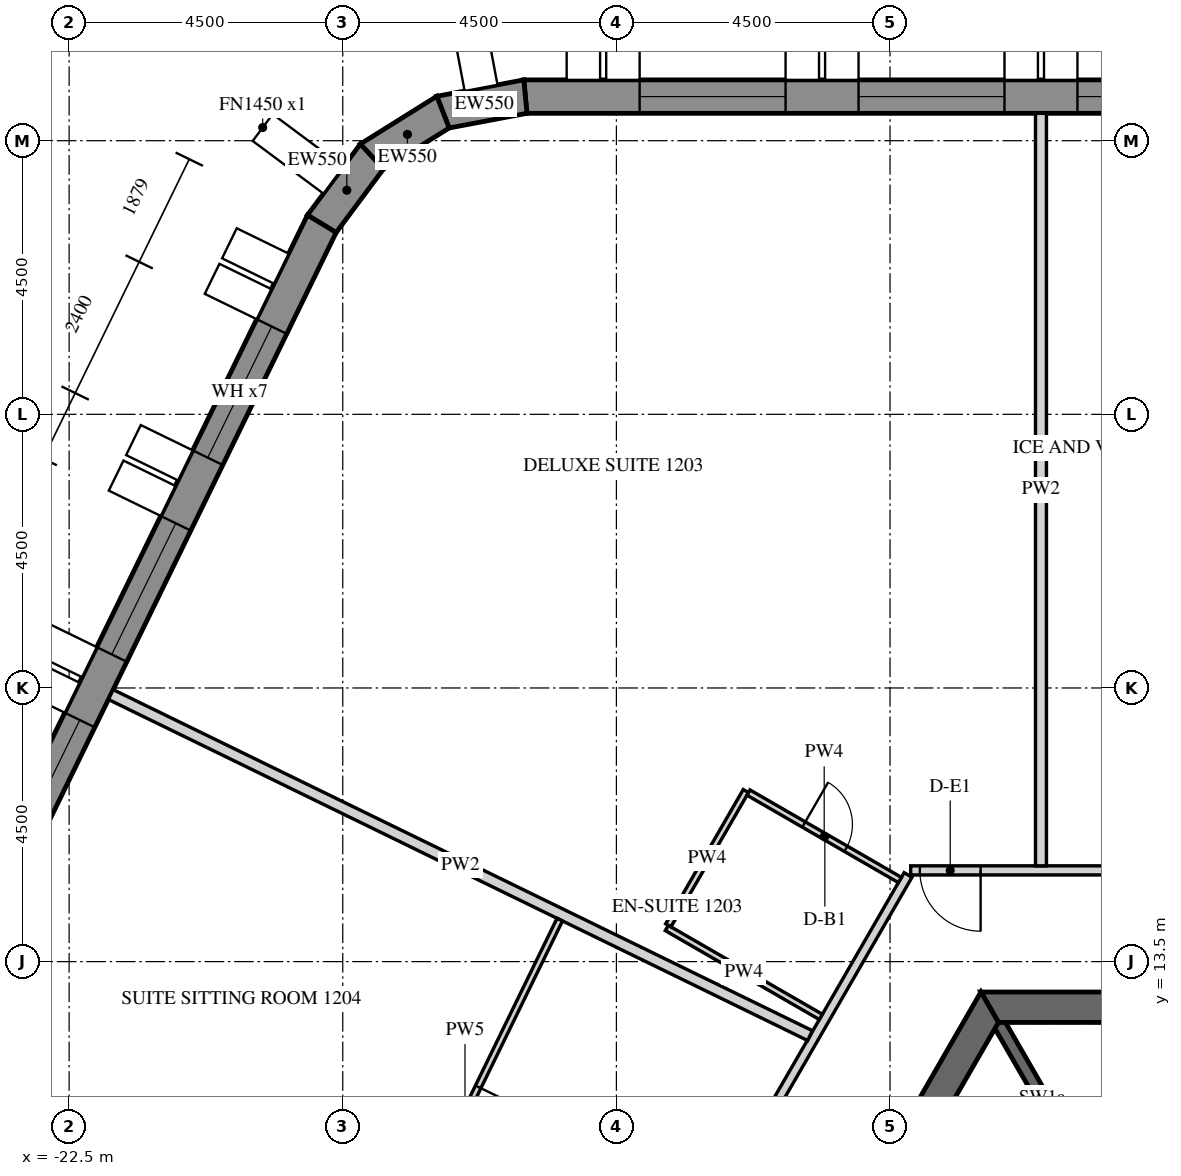
"""IFC4 building model, lengths in metres.
Left out: names, types, materials, properties, quantities, classifications, styles, units other than length and angle.
Written with IfcOpenShell. Run it as: python <this file> out.ifc"""

import sys

from ifc_helpers import new_model, si_unit, direction, frame, frame_2d, origin, place, context, subcontext, project, spatial, polyline, rectangle, outline, extrude, element, fill, save


model = new_model("IFC4")
c1 = context("Model", 3, precision=1e-05, world=origin(), true_north=direction((0.0, 1.0)))
c2 = subcontext(c1, "Body", "Model", "MODEL_VIEW")
j1 = project(units=[si_unit("LENGTHUNIT", "METRE"), si_unit("PLANEANGLEUNIT", "RADIAN")], contexts=[c1])
p1 = place(None, origin())
s1 = spatial("IfcSite", under=j1, at=p1, CompositionType="ELEMENT")
p2 = place(p1, origin())
s2 = spatial("IfcBuilding", under=s1, at=p2, CompositionType="ELEMENT")
p3 = place(p2, frame((0.0, 0.0, 164.4)))
s3 = spatial("IfcBuildingStorey", under=s2, at=p3, CompositionType="ELEMENT", Elevation=164.4)
p4 = place(p3, frame((12.761, 27.725, -0.15), z_axis=(0.0, 0.0, 1.0), x_axis=(-1.0, 0.0, 0.0)))
e1 = element("IfcWall", 1, at=p4, inside=s3, PredefinedType="SOLIDWALL", context=c2, shape_type="SweptSolid", body=[
    extrude(outline(polyline([(-0.022, -0.275), (27.783, -0.275), (27.732, 0.275), (0.022, 0.275), (-0.022, -0.275)])), origin(), (0.0, 0.0, 1.0), 3.9),
])
p5 = place(p4, frame((1.879, 0.0, 1.05)))
e2 = element("IfcOpeningElement", 2, at=p5, cuts=e1, PredefinedType="OPENING", context=c2, shape_type="SweptSolid", body=[
    extrude(rectangle(XDim=2.4, YDim=2.4, at=frame_2d((1.2, 1.2))), frame((0.0, 0.285, 0.0), z_axis=(0.0, -1.0, 0.0), x_axis=(1.0, 0.0, 0.0)), (0.0, 0.0, 1.0), 0.57),
])
p6 = place(p4, frame((5.479, 0.0, 1.05)))
e3 = element("IfcOpeningElement", 3, at=p6, cuts=e1, PredefinedType="OPENING", context=c2, shape_type="SweptSolid", body=[
    extrude(rectangle(XDim=2.4, YDim=2.4, at=frame_2d((1.2, 1.2))), frame((0.0, 0.285, 0.0), z_axis=(0.0, -1.0, 0.0), x_axis=(1.0, 0.0, 0.0)), (0.0, 0.0, 1.0), 0.57),
])
p7 = place(p4, frame((9.079, 0.0, 1.05)))
e4 = element("IfcOpeningElement", 4, at=p7, cuts=e1, PredefinedType="OPENING", context=c2, shape_type="SweptSolid", body=[
    extrude(rectangle(XDim=2.4, YDim=2.4, at=frame_2d((1.2, 1.2))), frame((0.0, 0.285, 0.0), z_axis=(0.0, -1.0, 0.0), x_axis=(1.0, 0.0, 0.0)), (0.0, 0.0, 1.0), 0.57),
])
p8 = place(p4, frame((12.679, 0.0, 1.05)))
e5 = element("IfcOpeningElement", 5, at=p8, cuts=e1, PredefinedType="OPENING", context=c2, shape_type="SweptSolid", body=[
    extrude(rectangle(XDim=2.4, YDim=2.4, at=frame_2d((1.2, 1.2))), frame((0.0, 0.285, 0.0), z_axis=(0.0, -1.0, 0.0), x_axis=(1.0, 0.0, 0.0)), (0.0, 0.0, 1.0), 0.57),
])
p9 = place(p4, frame((16.279, 0.0, 1.05)))
e6 = element("IfcOpeningElement", 6, at=p9, cuts=e1, PredefinedType="OPENING", context=c2, shape_type="SweptSolid", body=[
    extrude(rectangle(XDim=2.4, YDim=2.4, at=frame_2d((1.2, 1.2))), frame((0.0, 0.285, 0.0), z_axis=(0.0, -1.0, 0.0), x_axis=(1.0, 0.0, 0.0)), (0.0, 0.0, 1.0), 0.57),
])
p10 = place(p4, frame((19.879, 0.0, 1.05)))
e7 = element("IfcOpeningElement", 7, at=p10, cuts=e1, PredefinedType="OPENING", context=c2, shape_type="SweptSolid", body=[
    extrude(rectangle(XDim=2.4, YDim=2.4, at=frame_2d((1.2, 1.2))), frame((0.0, 0.285, 0.0), z_axis=(0.0, -1.0, 0.0), x_axis=(1.0, 0.0, 0.0)), (0.0, 0.0, 1.0), 0.57),
])
p11 = place(p4, frame((23.479, 0.0, 1.05)))
e8 = element("IfcOpeningElement", 8, at=p11, cuts=e1, PredefinedType="OPENING", context=c2, shape_type="SweptSolid", body=[
    extrude(rectangle(XDim=2.4, YDim=2.4, at=frame_2d((1.2, 1.2))), frame((0.0, 0.285, 0.0), z_axis=(0.0, -1.0, 0.0), x_axis=(1.0, 0.0, 0.0)), (0.0, 0.0, 1.0), 0.57),
])
p12 = place(p3, frame((-14.997, 27.725, -0.15), z_axis=(0.0, 0.0, 1.0), x_axis=(-0.982705443133, -0.185175624845, 0.0)))
e9 = element("IfcWall", 9, at=p12, inside=s3, PredefinedType="SOLIDWALL", context=c2, shape_type="SweptSolid", body=[
    extrude(outline(polyline([(-0.026, -0.275), (1.431, -0.275), (1.327, 0.275), (0.026, 0.275), (-0.026, -0.275)])), origin(), (0.0, 0.0, 1.0), 3.9),
])
p13 = place(p3, frame((-16.352, 27.47, -0.15), z_axis=(0.0, 0.0, 1.0), x_axis=(-0.848057977594, -0.5299034503, 0.0)))
e10 = element("IfcWall", 10, at=p13, inside=s3, PredefinedType="SOLIDWALL", context=c2, shape_type="SweptSolid", body=[
    extrude(outline(polyline([(-0.052, -0.275), (1.431, -0.275), (1.327, 0.275), (0.052, 0.275), (-0.052, -0.275)])), origin(), (0.0, 0.0, 1.0), 3.9),
])
p14 = place(p3, frame((-17.521, 26.739, -0.15), z_axis=(0.0, 0.0, 1.0), x_axis=(-0.597135295884, -0.802140535324, 0.0)))
e11 = element("IfcWall", 11, at=p14, inside=s3, PredefinedType="SOLIDWALL", context=c2, shape_type="SweptSolid", body=[
    extrude(outline(polyline([(-0.052, -0.275), (1.405, -0.275), (1.354, 0.275), (0.052, 0.275), (-0.052, -0.275)])), origin(), (0.0, 0.0, 1.0), 3.9),
])
p15 = place(p3, frame((-18.345, 25.633, -0.15), z_axis=(0.0, 0.0, 1.0), x_axis=(-0.43837181828, -0.898793718791, 0.0)))
e12 = element("IfcWall", 12, at=p15, inside=s3, PredefinedType="SOLIDWALL", context=c2, shape_type="SweptSolid", body=[
    extrude(outline(polyline([(-0.026, -0.275), (27.78, -0.275), (27.735, 0.275), (0.026, 0.275), (-0.026, -0.275)])), origin(), (0.0, 0.0, 1.0), 3.9),
])
p16 = place(p15, frame((1.879, 0.0, 1.05)))
e13 = element("IfcOpeningElement", 13, at=p16, cuts=e12, PredefinedType="OPENING", context=c2, shape_type="SweptSolid", body=[
    extrude(rectangle(XDim=2.4, YDim=2.4, at=frame_2d((1.2, 1.2))), frame((0.0, 0.285, 0.0), z_axis=(0.0, -1.0, 0.0), x_axis=(1.0, 0.0, 0.0)), (0.0, 0.0, 1.0), 0.57),
])
p17 = place(p15, frame((5.479, 0.0, 1.05)))
e14 = element("IfcOpeningElement", 14, at=p17, cuts=e12, PredefinedType="OPENING", context=c2, shape_type="SweptSolid", body=[
    extrude(rectangle(XDim=2.4, YDim=2.4, at=frame_2d((1.2, 1.2))), frame((0.0, 0.285, 0.0), z_axis=(0.0, -1.0, 0.0), x_axis=(1.0, 0.0, 0.0)), (0.0, 0.0, 1.0), 0.57),
])
p18 = place(p15, frame((9.079, 0.0, 1.05)))
e15 = element("IfcOpeningElement", 15, at=p18, cuts=e12, PredefinedType="OPENING", context=c2, shape_type="SweptSolid", body=[
    extrude(rectangle(XDim=2.4, YDim=2.4, at=frame_2d((1.2, 1.2))), frame((0.0, 0.285, 0.0), z_axis=(0.0, -1.0, 0.0), x_axis=(1.0, 0.0, 0.0)), (0.0, 0.0, 1.0), 0.57),
])
p19 = place(p15, frame((12.679, 0.0, 1.05)))
e16 = element("IfcOpeningElement", 16, at=p19, cuts=e12, PredefinedType="OPENING", context=c2, shape_type="SweptSolid", body=[
    extrude(rectangle(XDim=2.4, YDim=2.4, at=frame_2d((1.2, 1.2))), frame((0.0, 0.285, 0.0), z_axis=(0.0, -1.0, 0.0), x_axis=(1.0, 0.0, 0.0)), (0.0, 0.0, 1.0), 0.57),
])
p20 = place(p15, frame((16.279, 0.0, 1.05)))
e17 = element("IfcOpeningElement", 17, at=p20, cuts=e12, PredefinedType="OPENING", context=c2, shape_type="SweptSolid", body=[
    extrude(rectangle(XDim=2.4, YDim=2.4, at=frame_2d((1.2, 1.2))), frame((0.0, 0.285, 0.0), z_axis=(0.0, -1.0, 0.0), x_axis=(1.0, 0.0, 0.0)), (0.0, 0.0, 1.0), 0.57),
])
p21 = place(p15, frame((19.879, 0.0, 1.05)))
e18 = element("IfcOpeningElement", 18, at=p21, cuts=e12, PredefinedType="OPENING", context=c2, shape_type="SweptSolid", body=[
    extrude(rectangle(XDim=2.4, YDim=2.4, at=frame_2d((1.2, 1.2))), frame((0.0, 0.285, 0.0), z_axis=(0.0, -1.0, 0.0), x_axis=(1.0, 0.0, 0.0)), (0.0, 0.0, 1.0), 0.57),
])
p22 = place(p15, frame((23.479, 0.0, 1.05)))
e19 = element("IfcOpeningElement", 19, at=p22, cuts=e12, PredefinedType="OPENING", context=c2, shape_type="SweptSolid", body=[
    extrude(rectangle(XDim=2.4, YDim=2.4, at=frame_2d((1.2, 1.2))), frame((0.0, 0.285, 0.0), z_axis=(0.0, -1.0, 0.0), x_axis=(1.0, 0.0, 0.0)), (0.0, 0.0, 1.0), 0.57),
])
p23 = place(p3, frame((-7.361, 12.75, -0.15), z_axis=(0.0, 0.0, 1.0), x_axis=(-0.50000571537, -0.866022103989, 0.0)))
e20 = element("IfcWall", 20, at=p23, inside=s3, PredefinedType="SHEAR", context=c2, shape_type="SweptSolid", body=[
    extrude(outline(polyline([(-0.144, -0.25), (14.867, -0.25), (14.578, 0.25), (0.144, 0.25), (-0.144, -0.25)])), origin(), (0.0, 0.0, 1.0), 3.9),
])
p24 = place(p23, frame((6.49, 0.0, 0.15)))
e21 = element("IfcOpeningElement", 21, at=p24, cuts=e20, PredefinedType="OPENING", context=c2, shape_type="SweptSolid", body=[
    extrude(rectangle(XDim=1.8, YDim=2.4, at=frame_2d((0.9, 1.2))), frame((0.0, 0.26, 0.0), z_axis=(0.0, -1.0, 0.0), x_axis=(1.0, 0.0, 0.0)), (0.0, 0.0, 1.0), 0.52),
])
p25 = place(p3, frame((7.361, 12.75, -0.15), z_axis=(0.0, 0.0, 1.0), x_axis=(-1.0, 0.0, 0.0)))
e22 = element("IfcWall", 22, at=p25, inside=s3, PredefinedType="SHEAR", context=c2, shape_type="SweptSolid", body=[
    extrude(outline(polyline([(-0.144, -0.25), (14.866, -0.25), (14.578, 0.25), (0.144, 0.25), (-0.144, -0.25)])), origin(), (0.0, 0.0, 1.0), 3.9),
])
p26 = place(p25, frame((6.761, 0.0, 0.15)))
e23 = element("IfcOpeningElement", 23, at=p26, cuts=e22, PredefinedType="OPENING", context=c2, shape_type="SweptSolid", body=[
    extrude(rectangle(XDim=1.2, YDim=2.4, at=frame_2d((0.6, 1.2))), frame((0.0, 0.26, 0.0), z_axis=(0.0, -1.0, 0.0), x_axis=(1.0, 0.0, 0.0)), (0.0, 0.0, 1.0), 0.52),
])
p27 = place(p3, frame((-5.773, 10.0, -0.15), z_axis=(0.0, 0.0, 1.0), x_axis=(-0.499995765644, 0.866027848477, 0.0)))
e24 = element("IfcWall", 24, at=p27, inside=s3, PredefinedType="SHEAR", context=c2, shape_type="SweptSolid", body=[
    extrude(rectangle(XDim=2.887, YDim=0.2, at=frame_2d((1.443, 0.0))), origin(), (0.0, 0.0, 1.0), 3.9),
])
p28 = place(p3, frame((6.207, 15.0, 0.0), z_axis=(0.0, 0.0, 1.0), x_axis=(-1.0, 0.0, 0.0)))
e25 = element("IfcWall", 25, at=p28, inside=s3, PredefinedType="PARTITIONING", context=c2, shape_type="SweptSolid", body=[
    extrude(rectangle(XDim=14.867, YDim=0.15, at=frame_2d((7.433, 0.0))), origin(), (0.0, 0.0, 1.0), 2.988),
])
p29 = place(p28, frame((1.424, 0.0, 0.0)))
e26 = element("IfcOpeningElement", 26, at=p29, cuts=e25, PredefinedType="OPENING", context=c2, shape_type="SweptSolid", body=[
    extrude(rectangle(XDim=1.0, YDim=2.1, at=frame_2d((0.5, 1.05))), frame((0.0, 0.085, 0.0), z_axis=(0.0, -1.0, 0.0), x_axis=(1.0, 0.0, 0.0)), (0.0, 0.0, 1.0), 0.17),
])
p30 = place(p28, frame((10.424, 0.0, 0.0)))
e27 = element("IfcOpeningElement", 27, at=p30, cuts=e25, PredefinedType="OPENING", context=c2, shape_type="SweptSolid", body=[
    extrude(rectangle(XDim=1.0, YDim=2.1, at=frame_2d((0.5, 1.05))), frame((0.0, 0.085, 0.0), z_axis=(0.0, -1.0, 0.0), x_axis=(1.0, 0.0, 0.0)), (0.0, 0.0, 1.0), 0.17),
])
p31 = place(p28, frame((13.717, 0.0, 0.0)))
e28 = element("IfcOpeningElement", 28, at=p31, cuts=e25, PredefinedType="OPENING", context=c2, shape_type="SweptSolid", body=[
    extrude(rectangle(XDim=1.0, YDim=2.1, at=frame_2d((0.5, 1.05))), frame((0.0, 0.085, 0.0), z_axis=(0.0, -1.0, 0.0), x_axis=(1.0, 0.0, 0.0)), (0.0, 0.0, 1.0), 0.17),
])
p32 = place(p3, frame((-8.704, 14.925, 0.0), z_axis=(0.0, 0.0, 1.0), x_axis=(-0.499988884089, -0.866031821464, 0.0)))
e29 = element("IfcWall", 29, at=p32, inside=s3, PredefinedType="PARTITIONING", context=c2, shape_type="SweptSolid", body=[
    extrude(rectangle(XDim=14.78, YDim=0.15, at=frame_2d((7.39, 0.0))), origin(), (0.0, 0.0, 1.0), 2.988),
])
p33 = place(p32, frame((7.281, 0.0, 0.0)))
e30 = element("IfcOpeningElement", 30, at=p33, cuts=e29, PredefinedType="OPENING", context=c2, shape_type="SweptSolid", body=[
    extrude(rectangle(XDim=1.0, YDim=2.1, at=frame_2d((0.5, 1.05))), frame((0.0, 0.085, 0.0), z_axis=(0.0, -1.0, 0.0), x_axis=(1.0, 0.0, 0.0)), (0.0, 0.0, 1.0), 0.17),
])
p34 = place(p3, frame((-6.518, 27.45, 0.0), z_axis=(0.0, 0.0, 1.0), x_axis=(0.0, -1.0, 0.0)))
e31 = element("IfcWall", 31, at=p34, inside=s3, PredefinedType="PARTITIONING", context=c2, shape_type="SweptSolid", body=[
    extrude(rectangle(XDim=12.375, YDim=0.18, at=frame_2d((6.188, 0.0))), origin(), (0.0, 0.0, 1.0), 2.988),
])
p35 = place(p3, frame((-10.138, 12.591, 0.0), z_axis=(0.0, 0.0, 1.0), x_axis=(-0.866025730634, 0.499999433879, 0.0)))
e32 = element("IfcWall", 32, at=p35, inside=s3, PredefinedType="PARTITIONING", context=c2, shape_type="SweptSolid", body=[
    extrude(rectangle(XDim=2.925, YDim=0.1, at=frame_2d((1.462, 0.0))), origin(), (0.0, 0.0, 1.0), 2.988),
])
p36 = place(p3, frame((-12.646, 14.096, 0.0), z_axis=(0.0, 0.0, 1.0), x_axis=(0.500020783669, 0.866013403995, 0.0)))
e33 = element("IfcWall", 33, at=p36, inside=s3, PredefinedType="PARTITIONING", context=c2, shape_type="SweptSolid", body=[
    extrude(rectangle(XDim=2.55, YDim=0.1, at=frame_2d((1.275, 0.0))), origin(), (0.0, 0.0, 1.0), 2.988),
])
p37 = place(p3, frame((-11.328, 16.28, 0.0), z_axis=(0.0, 0.0, 1.0), x_axis=(0.865981939951, -0.500075274012, 0.0)))
e34 = element("IfcWall", 34, at=p37, inside=s3, PredefinedType="PARTITIONING", context=c2, shape_type="SweptSolid", body=[
    extrude(rectangle(XDim=2.875, YDim=0.1, at=frame_2d((1.438, 0.0))), origin(), (0.0, 0.0, 1.0), 2.988),
])
p38 = place(p37, frame((1.05, 0.0, 0.0)))
e35 = element("IfcOpeningElement", 35, at=p38, cuts=e34, PredefinedType="OPENING", context=c2, shape_type="SweptSolid", body=[
    extrude(rectangle(XDim=0.8, YDim=2.1, at=frame_2d((0.4, 1.05))), frame((0.0, 0.06, 0.0), z_axis=(0.0, -1.0, 0.0), x_axis=(1.0, 0.0, 0.0)), (0.0, 0.0, 1.0), 0.12),
])
p39 = place(p3, frame((-21.815, 17.892, 0.0), z_axis=(0.0, 0.0, 1.0), x_axis=(0.898799253997, -0.438360469265, 0.0)))
e36 = element("IfcWall", 36, at=p39, inside=s3, PredefinedType="PARTITIONING", context=c2, shape_type="SweptSolid", body=[
    extrude(rectangle(XDim=12.794, YDim=0.18, at=frame_2d((6.397, 0.0))), origin(), (0.0, 0.0, 1.0), 2.988),
])
p40 = place(p3, frame((-14.431, 14.19, 0.0), z_axis=(0.0, 0.0, 1.0), x_axis=(-0.438387776054, -0.898785935475, 0.0)))
e37 = element("IfcWall", 37, at=p40, inside=s3, PredefinedType="PARTITIONING", context=c2, shape_type="SweptSolid", body=[
    extrude(rectangle(XDim=7.11, YDim=0.1, at=frame_2d((3.555, 0.0))), origin(), (0.0, 0.0, 1.0), 2.988),
])
p41 = place(p40, frame((3.06, 0.0, 0.0)))
e38 = element("IfcOpeningElement", 38, at=p41, cuts=e37, PredefinedType="OPENING", context=c2, shape_type="SweptSolid", body=[
    extrude(rectangle(XDim=0.9, YDim=2.1, at=frame_2d((0.45, 1.05))), frame((0.0, 0.06, 0.0), z_axis=(0.0, -1.0, 0.0), x_axis=(1.0, 0.0, 0.0)), (0.0, 0.0, 1.0), 0.12),
])
p42 = place(p3, frame((-17.593, 7.822, 0.0), z_axis=(0.0, 0.0, 1.0), x_axis=(-0.898803316846, 0.438352138842, 0.0)))
e39 = element("IfcWall", 39, at=p42, inside=s3, PredefinedType="PARTITIONING", context=c2, shape_type="SweptSolid", body=[
    extrude(rectangle(XDim=8.208, YDim=0.1, at=frame_2d((4.104, 0.0))), origin(), (0.0, 0.0, 1.0), 2.988),
])
p43 = place(p9, frame((0.0, 0.205, 0.0)))
e40 = element("IfcWindow", 40, at=p43, inside=s3, PartitioningType="DOUBLE_PANEL_VERTICAL", PredefinedType="WINDOW", context=c2, shape_type="SweptSolid", body=[
    extrude(rectangle(XDim=2.4, YDim=2.4, at=frame_2d((1.2, 1.2))), frame((0.0, 0.03, 0.0), z_axis=(0.0, -1.0, 0.0), x_axis=(1.0, 0.0, 0.0)), (0.0, 0.0, 1.0), 0.06),
])
fill(e6, e40)
p44 = place(p10, frame((0.0, 0.205, 0.0)))
e41 = element("IfcWindow", 41, at=p44, inside=s3, PartitioningType="DOUBLE_PANEL_VERTICAL", PredefinedType="WINDOW", context=c2, shape_type="SweptSolid", body=[
    extrude(rectangle(XDim=2.4, YDim=2.4, at=frame_2d((1.2, 1.2))), frame((0.0, 0.03, 0.0), z_axis=(0.0, -1.0, 0.0), x_axis=(1.0, 0.0, 0.0)), (0.0, 0.0, 1.0), 0.06),
])
fill(e7, e41)
p45 = place(p11, frame((0.0, 0.205, 0.0)))
e42 = element("IfcWindow", 42, at=p45, inside=s3, PartitioningType="DOUBLE_PANEL_VERTICAL", PredefinedType="WINDOW", context=c2, shape_type="SweptSolid", body=[
    extrude(rectangle(XDim=2.4, YDim=2.4, at=frame_2d((1.2, 1.2))), frame((0.0, 0.03, 0.0), z_axis=(0.0, -1.0, 0.0), x_axis=(1.0, 0.0, 0.0)), (0.0, 0.0, 1.0), 0.06),
])
fill(e8, e42)
p46 = place(p16, frame((0.0, 0.205, 0.0)))
e43 = element("IfcWindow", 43, at=p46, inside=s3, PartitioningType="DOUBLE_PANEL_VERTICAL", PredefinedType="WINDOW", context=c2, shape_type="SweptSolid", body=[
    extrude(rectangle(XDim=2.4, YDim=2.4, at=frame_2d((1.2, 1.2))), frame((0.0, 0.03, 0.0), z_axis=(0.0, -1.0, 0.0), x_axis=(1.0, 0.0, 0.0)), (0.0, 0.0, 1.0), 0.06),
])
fill(e13, e43)
p47 = place(p17, frame((0.0, 0.205, 0.0)))
e44 = element("IfcWindow", 44, at=p47, inside=s3, PartitioningType="DOUBLE_PANEL_VERTICAL", PredefinedType="WINDOW", context=c2, shape_type="SweptSolid", body=[
    extrude(rectangle(XDim=2.4, YDim=2.4, at=frame_2d((1.2, 1.2))), frame((0.0, 0.03, 0.0), z_axis=(0.0, -1.0, 0.0), x_axis=(1.0, 0.0, 0.0)), (0.0, 0.0, 1.0), 0.06),
])
fill(e14, e44)
p48 = place(p18, frame((0.0, 0.205, 0.0)))
e45 = element("IfcWindow", 45, at=p48, inside=s3, PartitioningType="DOUBLE_PANEL_VERTICAL", PredefinedType="WINDOW", context=c2, shape_type="SweptSolid", body=[
    extrude(rectangle(XDim=2.4, YDim=2.4, at=frame_2d((1.2, 1.2))), frame((0.0, 0.03, 0.0), z_axis=(0.0, -1.0, 0.0), x_axis=(1.0, 0.0, 0.0)), (0.0, 0.0, 1.0), 0.06),
])
fill(e15, e45)
p49 = place(p31, origin())
e46 = element("IfcDoor", 46, at=p49, inside=s3, OperationType="SINGLE_SWING_LEFT", PredefinedType="DOOR", context=c2, shape_type="SweptSolid", body=[
    extrude(rectangle(XDim=1.0, YDim=2.1, at=frame_2d((0.5, 1.05))), frame((0.0, 0.025, 0.0), z_axis=(0.0, -1.0, 0.0), x_axis=(1.0, 0.0, 0.0)), (0.0, 0.0, 1.0), 0.05),
])
fill(e28, e46)
p50 = place(p38, origin())
e47 = element("IfcDoor", 47, at=p50, inside=s3, OperationType="SINGLE_SWING_LEFT", PredefinedType="DOOR", context=c2, shape_type="SweptSolid", body=[
    extrude(rectangle(XDim=0.8, YDim=2.1, at=frame_2d((0.4, 1.05))), frame((0.0, 0.025, 0.0), z_axis=(0.0, -1.0, 0.0), x_axis=(1.0, 0.0, 0.0)), (0.0, 0.0, 1.0), 0.05),
])
fill(e35, e47)
p51 = place(p41, origin())
e48 = element("IfcDoor", 48, at=p51, inside=s3, OperationType="SINGLE_SWING_RIGHT", PredefinedType="DOOR", context=c2, shape_type="SweptSolid", body=[
    extrude(rectangle(XDim=0.9, YDim=2.1, at=frame_2d((0.45, 1.05))), frame((0.0, 0.025, 0.0), z_axis=(0.0, -1.0, 0.0), x_axis=(1.0, 0.0, 0.0)), (0.0, 0.0, 1.0), 0.05),
])
fill(e38, e48)
save(model, sys.argv[1])
